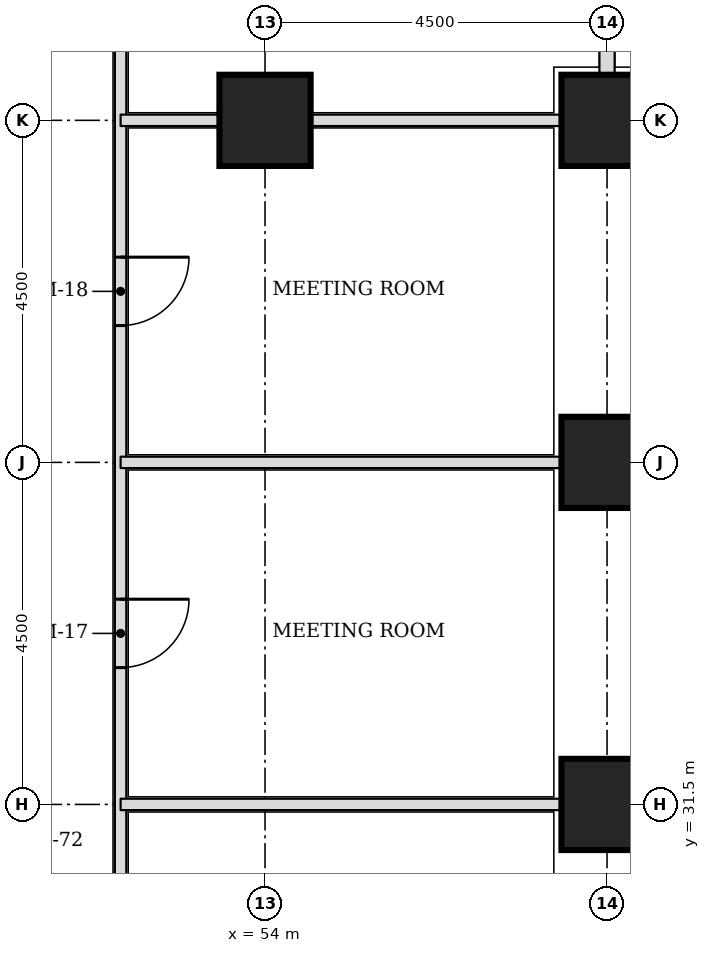
"""IFC4 building model, lengths in metres.
Left out: names, types, materials, properties, quantities, classifications, styles, units other than length and angle.
Written with IfcOpenShell. Run it as: python <this file> out.ifc"""

import sys

from ifc_helpers import new_model, si_unit, direction, frame, frame_2d, origin, origin_2d, place, context, subcontext, project, spatial, rectangle, extrude, element, fill, save


model = new_model("IFC4")
c1 = context("Model", 3, precision=1e-05, world=origin(), true_north=direction((0.0, 1.0)))
c2 = subcontext(c1, "Body", "Model", "MODEL_VIEW")
j1 = project(units=[si_unit("LENGTHUNIT", "METRE"), si_unit("PLANEANGLEUNIT", "RADIAN")], contexts=[c1])
p1 = place(None, origin())
s1 = spatial("IfcSite", under=j1, at=p1, CompositionType="ELEMENT")
p2 = place(p1, origin())
s2 = spatial("IfcBuilding", under=s1, at=p2, CompositionType="ELEMENT")
p3 = place(p2, frame((0.0, 0.0, 23.1)))
s3 = spatial("IfcBuildingStorey", under=s2, at=p3, CompositionType="ELEMENT", Elevation=23.1)
for number, where, z_axis, x_axis in (
    (1, (58.5, 31.5, 0.0), (0.0, 0.0, 1.0), (1.0, 0.0, 0.0)),
    (2, (58.5, 36.0, 0.0), (0.0, 0.0, 1.0), (1.0, 0.0, 0.0)),
    (3, (54.0, 40.5, 0.0), (0.0, 0.0, 1.0), (1.0, 0.0, 0.0)),
    (4, (58.5, 40.5, 0.0), (0.0, 0.0, 1.0), (1.0, 0.0, 0.0)),
):
    element("IfcColumn", number, at=place(p3, frame(where, z_axis=z_axis, x_axis=x_axis)), inside=s3, PredefinedType="COLUMN", context=c2, shape_type="SweptSolid", body=[
        extrude(rectangle(XDim=1.2, YDim=1.2, at=origin_2d()), origin(), (0.0, 0.0, 1.0), 3.3),
    ])
p4 = place(p3, frame((58.5, 41.1, 0.0), z_axis=(0.0, 0.0, 1.0), x_axis=(0.0, 1.0, 0.0)))
e5 = element("IfcWall", 5, at=p4, inside=s3, PredefinedType="PARTITIONING", context=c2, shape_type="SweptSolid", body=[
    extrude(rectangle(XDim=6.4, YDim=0.2, at=frame_2d((3.2, 0.0))), origin(), (0.0, 0.0, 1.0), 3.08),
])
p5 = place(p3, frame((52.1, 24.4, 0.0), z_axis=(0.0, 0.0, 1.0), x_axis=(0.0, 1.0, 0.0)))
e6 = element("IfcWall", 6, at=p5, inside=s3, PredefinedType="PARTITIONING", context=c2, shape_type="SweptSolid", body=[
    extrude(rectangle(XDim=23.1, YDim=0.15, at=frame_2d((11.55, 0.0))), origin(), (0.0, 0.0, 1.0), 3.08),
])
p6 = place(p5, frame((0.447, 0.0, 0.0)))
e7 = element("IfcOpeningElement", 7, at=p6, cuts=e6, PredefinedType="OPENING", context=c2, shape_type="SweptSolid", body=[
    extrude(rectangle(XDim=0.9, YDim=2.1, at=frame_2d((0.45, 1.05))), frame((0.0, 0.085, 0.0), z_axis=(0.0, -1.0, 0.0), x_axis=(1.0, 0.0, 0.0)), (0.0, 0.0, 1.0), 0.17),
])
p7 = place(p5, frame((4.4, 0.0, 0.0)))
e8 = element("IfcOpeningElement", 8, at=p7, cuts=e6, PredefinedType="OPENING", context=c2, shape_type="SweptSolid", body=[
    extrude(rectangle(XDim=0.9, YDim=2.1, at=frame_2d((0.45, 1.05))), frame((0.0, 0.085, 0.0), z_axis=(0.0, -1.0, 0.0), x_axis=(1.0, 0.0, 0.0)), (0.0, 0.0, 1.0), 0.17),
])
p8 = place(p5, frame((8.9, 0.0, 0.0)))
e9 = element("IfcOpeningElement", 9, at=p8, cuts=e6, PredefinedType="OPENING", context=c2, shape_type="SweptSolid", body=[
    extrude(rectangle(XDim=0.9, YDim=2.1, at=frame_2d((0.45, 1.05))), frame((0.0, 0.085, 0.0), z_axis=(0.0, -1.0, 0.0), x_axis=(1.0, 0.0, 0.0)), (0.0, 0.0, 1.0), 0.17),
])
p9 = place(p5, frame((13.4, 0.0, 0.0)))
e10 = element("IfcOpeningElement", 10, at=p9, cuts=e6, PredefinedType="OPENING", context=c2, shape_type="SweptSolid", body=[
    extrude(rectangle(XDim=0.9, YDim=2.1, at=frame_2d((0.45, 1.05))), frame((0.0, 0.085, 0.0), z_axis=(0.0, -1.0, 0.0), x_axis=(1.0, 0.0, 0.0)), (0.0, 0.0, 1.0), 0.17),
])
p10 = place(p5, frame((19.15, 0.0, 0.0)))
e11 = element("IfcOpeningElement", 11, at=p10, cuts=e6, PredefinedType="OPENING", context=c2, shape_type="SweptSolid", body=[
    extrude(rectangle(XDim=0.9, YDim=2.1, at=frame_2d((0.45, 1.05))), frame((0.0, 0.085, 0.0), z_axis=(0.0, -1.0, 0.0), x_axis=(1.0, 0.0, 0.0)), (0.0, 0.0, 1.0), 0.17),
])
for number, where, z_axis, x_axis in (
    (12, (52.1, 31.5, 0.0), (0.0, 0.0, 1.0), (1.0, 0.0, 0.0)),
    (13, (52.1, 36.0, 0.0), (0.0, 0.0, 1.0), (1.0, 0.0, 0.0)),
):
    element("IfcWall", number, at=place(p3, frame(where, z_axis=z_axis, x_axis=x_axis)), inside=s3, PredefinedType="PARTITIONING", context=c2, shape_type="SweptSolid", body=[
        extrude(rectangle(XDim=5.8, YDim=0.15, at=frame_2d((2.9, 0.0))), origin(), (0.0, 0.0, 1.0), 3.08),
    ])
p11 = place(p3, frame((52.1, 40.5, 0.0), z_axis=(0.0, 0.0, 1.0), x_axis=(1.0, 0.0, 0.0)))
e14 = element("IfcWall", 14, at=p11, inside=s3, PredefinedType="PARTITIONING", context=c2, shape_type="SweptSolid", body=[
    extrude(rectangle(XDim=5.8, YDim=0.15, at=frame_2d((2.9, 0.0))), origin(), (0.0, 0.0, 1.0), 2.33),
])
p12 = place(p8, frame((0.9, 0.0, 0.0), z_axis=(0.0, 0.0, 1.0), x_axis=(-1.0, 0.0, 0.0)))
e15 = element("IfcDoor", 15, at=p12, inside=s3, OperationType="SINGLE_SWING_LEFT", PredefinedType="DOOR", context=c2, shape_type="SweptSolid", body=[
    extrude(rectangle(XDim=0.9, YDim=2.1, at=frame_2d((0.45, 1.05))), frame((0.0, 0.025, 0.0), z_axis=(0.0, -1.0, 0.0), x_axis=(1.0, 0.0, 0.0)), (0.0, 0.0, 1.0), 0.05),
])
fill(e9, e15)
p13 = place(p9, frame((0.9, 0.0, 0.0), z_axis=(0.0, 0.0, 1.0), x_axis=(-1.0, 0.0, 0.0)))
e16 = element("IfcDoor", 16, at=p13, inside=s3, OperationType="SINGLE_SWING_LEFT", PredefinedType="DOOR", context=c2, shape_type="SweptSolid", body=[
    extrude(rectangle(XDim=0.9, YDim=2.1, at=frame_2d((0.45, 1.05))), frame((0.0, 0.025, 0.0), z_axis=(0.0, -1.0, 0.0), x_axis=(1.0, 0.0, 0.0)), (0.0, 0.0, 1.0), 0.05),
])
fill(e10, e16)
save(model, sys.argv[1])
